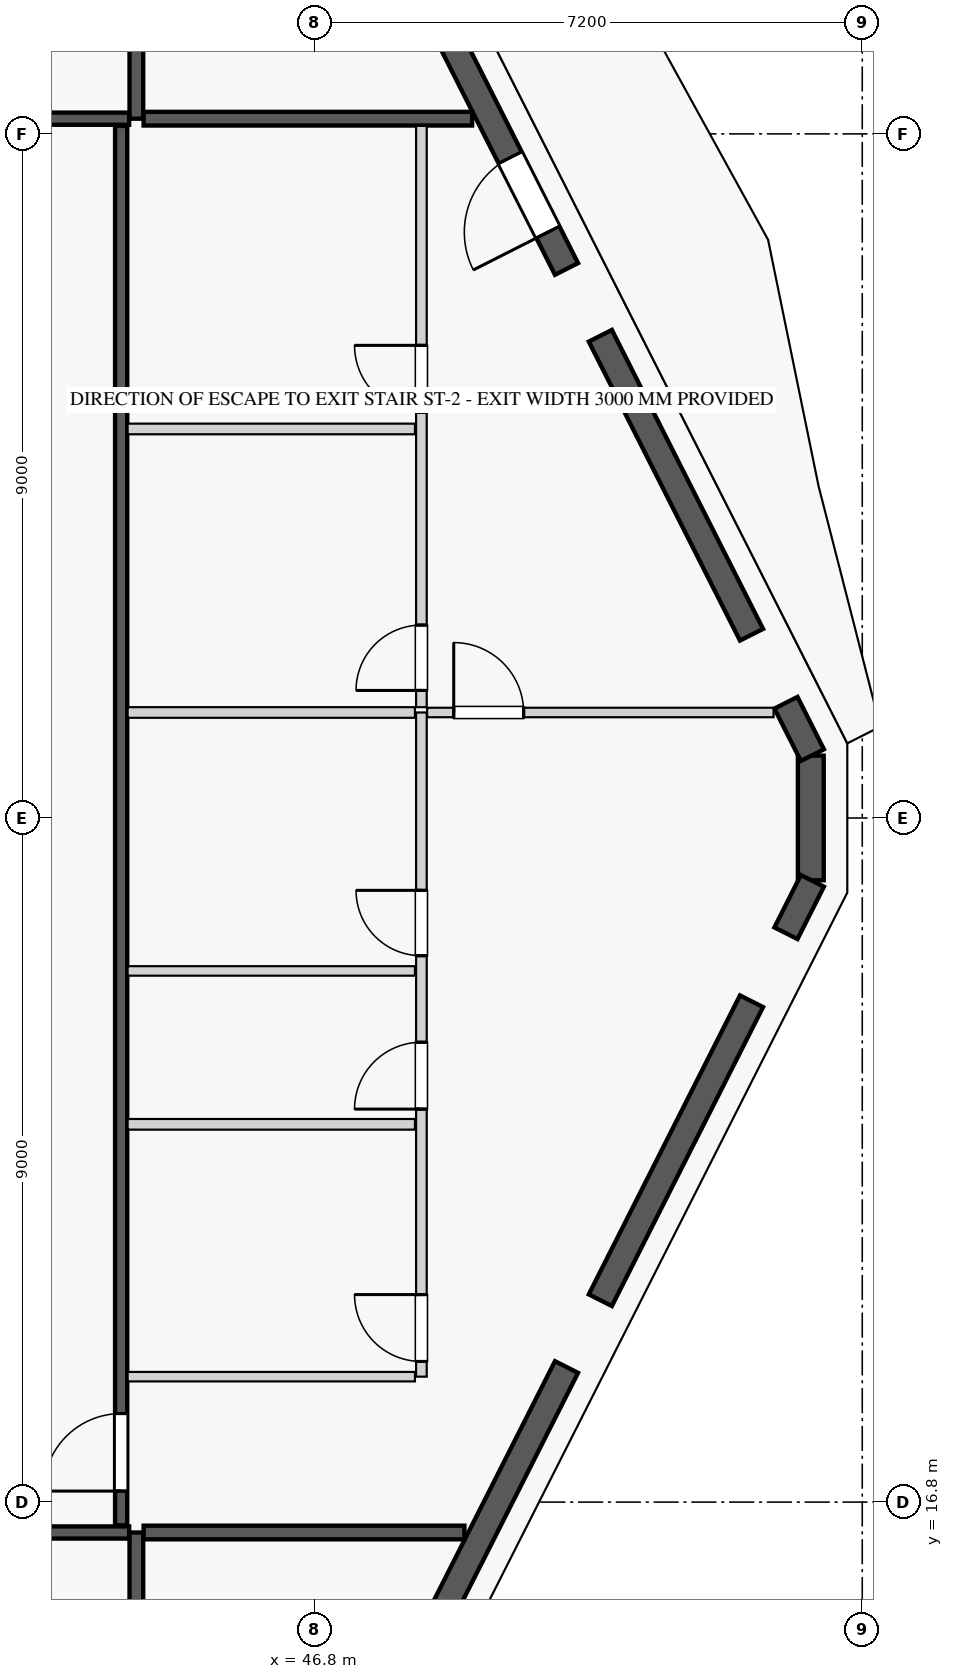
"""IFC4 building model, lengths in metres.
Left out: names, types, materials, properties, quantities, classifications, styles, units other than length and angle.
Written with IfcOpenShell. Run it as: python <this file> out.ifc"""

import sys

from ifc_helpers import new_model, si_unit, direction, frame, frame_2d, origin, origin_2d, place, context, subcontext, project, spatial, rectangle, extrude, element, fill, save


model = new_model("IFC4")
c1 = context("Model", 3, precision=1e-05, world=origin(), true_north=direction((0.0, 1.0)))
c2 = subcontext(c1, "Body", "Model", "MODEL_VIEW")
j1 = project(units=[si_unit("LENGTHUNIT", "METRE"), si_unit("PLANEANGLEUNIT", "RADIAN")], contexts=[c1])
p1 = place(None, origin())
s1 = spatial("IfcSite", under=j1, at=p1, CompositionType="ELEMENT")
p2 = place(p1, origin())
s2 = spatial("IfcBuilding", under=s1, at=p2, CompositionType="ELEMENT")
p3 = place(p2, frame((0.0, 0.0, 241.6)))
s3 = spatial("IfcBuildingStorey", under=s2, at=p3, CompositionType="ELEMENT", Elevation=241.6)
for number, where, z_axis, x_axis in (
    (1, (50.264, 19.033, 0.0), (0.0, 0.0, 1.0), (1.0, 0.0, 0.0)),
    (2, (52.737, 23.845, 0.0), (0.0, 0.0, 1.0), (1.0, 0.0, 0.0)),
    (3, (52.737, 27.755, 0.0), (0.0, 0.0, 1.0), (1.0, 0.0, 0.0)),
    (4, (50.264, 32.567, 0.0), (0.0, 0.0, 1.0), (1.0, 0.0, 0.0)),
):
    element("IfcColumn", number, at=place(p3, frame(where, z_axis=z_axis, x_axis=x_axis)), inside=s3, PredefinedType="COLUMN", context=c2, shape_type="SweptSolid", body=[
        extrude(rectangle(XDim=0.75, YDim=0.75, at=origin_2d()), origin(), (0.0, 0.0, 1.0), 3.65),
    ])
p4 = place(p3, frame((52.737, 25.8, 0.0), z_axis=(0.0, 0.0, 1.0), x_axis=(0.0, 1.0, 0.0)))
e5 = element("IfcColumn", 5, at=p4, inside=s3, PredefinedType="PILASTER", context=c2, shape_type="SweptSolid", body=[
    extrude(rectangle(XDim=0.5, YDim=0.35, at=origin_2d()), origin(), (0.0, 0.0, 1.0), 3.65),
])
p5 = place(p3, frame((53.323, 24.98, 0.0), z_axis=(0.0, 0.0, 1.0), x_axis=(0.0, 1.0, 0.0)))
e6 = element("IfcWall", 6, at=p5, inside=s3, PredefinedType="STANDARD", context=c2, shape_type="SweptSolid", body=[
    extrude(rectangle(XDim=1.64, YDim=0.34, at=frame_2d((0.82, 0.0))), origin(), (0.0, 0.0, 1.0), 3.45),
])
p6 = place(p3, frame((48.032, 14.473, 0.0), z_axis=(0.0, 0.0, 1.0), x_axis=(0.451539564999, 0.892251097641, 0.0)))
e7 = element("IfcWall", 7, at=p6, inside=s3, PredefinedType="STANDARD", context=c2, shape_type="SweptSolid", body=[
    extrude(rectangle(XDim=4.6, YDim=0.34, at=frame_2d((2.3, 0.0))), origin(), (0.0, 0.0, 1.0), 2.983),
])
p7 = place(p6, frame((0.4, 0.0, 0.75)))
e8 = element("IfcOpeningElement", 8, at=p7, cuts=e7, PredefinedType="OPENING", context=c2, shape_type="SweptSolid", body=[
    extrude(rectangle(XDim=1.1, YDim=2.0, at=frame_2d((0.55, 1.0))), frame((0.0, 0.18, 0.0), z_axis=(0.0, -1.0, 0.0), x_axis=(1.0, 0.0, 0.0)), (0.0, 0.0, 1.0), 0.36),
])
p8 = place(p6, frame((2.851, 0.0, 0.75)))
e9 = element("IfcOpeningElement", 9, at=p8, cuts=e7, PredefinedType="OPENING", context=c2, shape_type="SweptSolid", body=[
    extrude(rectangle(XDim=1.1, YDim=2.0, at=frame_2d((0.55, 1.0))), frame((0.0, 0.18, 0.0), z_axis=(0.0, -1.0, 0.0), x_axis=(1.0, 0.0, 0.0)), (0.0, 0.0, 1.0), 0.36),
])
p9 = place(p3, frame((50.554, 19.456, 0.0), z_axis=(0.0, 0.0, 1.0), x_axis=(0.45130817501, 0.892368158984, 0.0)))
e10 = element("IfcWall", 10, at=p9, inside=s3, PredefinedType="STANDARD", context=c2, shape_type="SweptSolid", body=[
    extrude(rectangle(XDim=4.407, YDim=0.34, at=frame_2d((2.204, 0.0))), origin(), (0.0, 0.0, 1.0), 2.983),
])
p10 = place(p9, frame((1.429, 0.0, 0.75)))
e11 = element("IfcOpeningElement", 11, at=p10, cuts=e10, PredefinedType="OPENING", context=c2, shape_type="SweptSolid", body=[
    extrude(rectangle(XDim=1.55, YDim=2.05, at=frame_2d((0.775, 1.025))), frame((0.0, 0.18, 0.0), z_axis=(0.0, -1.0, 0.0), x_axis=(1.0, 0.0, 0.0)), (0.0, 0.0, 1.0), 0.36),
])
for number, where, z_axis, x_axis in (
    (12, (52.996, 24.284, 0.0), (0.0, 0.0, 1.0), (0.451, 0.893, 0.0)),
    (13, (53.344, 26.627, 0.0), (0.0, 0.0, 1.0), (-0.451, 0.893, 0.0)),
):
    element("IfcWall", number, at=place(p3, frame(where, z_axis=z_axis, x_axis=x_axis)), inside=s3, PredefinedType="STANDARD", context=c2, shape_type="SweptSolid", body=[
        extrude(rectangle(XDim=0.772, YDim=0.34, at=frame_2d((0.386, 0.0))), origin(), (0.0, 0.0, 1.0), 3.45),
    ])
p11 = place(p3, frame((52.543, 28.211, 0.0), z_axis=(0.0, 0.0, 1.0), x_axis=(-0.451285866323, 0.892379441077, 0.0)))
e14 = element("IfcWall", 14, at=p11, inside=s3, PredefinedType="STANDARD", context=c2, shape_type="SweptSolid", body=[
    extrude(rectangle(XDim=4.407, YDim=0.34, at=frame_2d((2.204, 0.0))), origin(), (0.0, 0.0, 1.0), 2.983),
])
p12 = place(p11, frame((1.654, 0.0, 0.75)))
e15 = element("IfcOpeningElement", 15, at=p12, cuts=e14, PredefinedType="OPENING", context=c2, shape_type="SweptSolid", body=[
    extrude(rectangle(XDim=1.1, YDim=2.0, at=frame_2d((0.55, 1.0))), frame((0.0, 0.18, 0.0), z_axis=(0.0, -1.0, 0.0), x_axis=(1.0, 0.0, 0.0)), (0.0, 0.0, 1.0), 0.36),
])
p13 = place(p3, frame((50.109, 33.023, 0.0), z_axis=(0.0, 0.0, 1.0), x_axis=(-0.451539564999, 0.892251097641, 0.0)))
e16 = element("IfcWall", 16, at=p13, inside=s3, PredefinedType="STANDARD", context=c2, shape_type="SweptSolid", body=[
    extrude(rectangle(XDim=4.6, YDim=0.34, at=frame_2d((2.3, 0.0))), origin(), (0.0, 0.0, 1.0), 2.983),
])
p14 = place(p13, frame((0.542, 0.0, 0.0)))
e17 = element("IfcOpeningElement", 17, at=p14, cuts=e16, PredefinedType="OPENING", context=c2, shape_type="SweptSolid", body=[
    extrude(rectangle(XDim=1.1, YDim=2.25, at=frame_2d((0.55, 1.125))), frame((0.0, 0.18, 0.0), z_axis=(0.0, -1.0, 0.0), x_axis=(1.0, 0.0, 0.0)), (0.0, 0.0, 1.0), 0.36),
])
p15 = place(p13, frame((2.988, 0.0, 0.75)))
e18 = element("IfcOpeningElement", 18, at=p15, cuts=e16, PredefinedType="OPENING", context=c2, shape_type="SweptSolid", body=[
    extrude(rectangle(XDim=1.1, YDim=2.0, at=frame_2d((0.55, 1.0))), frame((0.0, 0.18, 0.0), z_axis=(0.0, -1.0, 0.0), x_axis=(1.0, 0.0, 0.0)), (0.0, 0.0, 1.0), 0.36),
])
p16 = place(p3, frame((44.45, 8.119, 0.0), z_axis=(0.0, 0.0, 1.0), x_axis=(0.0, 1.0, 0.0)))
e19 = element("IfcWall", 19, at=p16, inside=s3, PredefinedType="PARTITIONING", context=c2, shape_type="SweptSolid", body=[
    extrude(rectangle(XDim=8.281, YDim=0.18, at=frame_2d((4.141, 0.0))), origin(), (0.0, 0.0, 1.0), 3.45),
])
p17 = place(p3, frame((35.749, 16.4, 0.0), z_axis=(0.0, 0.0, 1.0), x_axis=(1.0, 0.0, 0.0)))
e20 = element("IfcWall", 20, at=p17, inside=s3, PredefinedType="PARTITIONING", context=c2, shape_type="SweptSolid", body=[
    extrude(rectangle(XDim=8.606, YDim=0.16, at=frame_2d((4.303, 0.0))), origin(), (0.0, 0.0, 1.0), 3.45),
])
p18 = place(p17, frame((0.355, 0.0, 0.0)))
e21 = element("IfcOpeningElement", 21, at=p18, cuts=e20, PredefinedType="OPENING", context=c2, shape_type="SweptSolid", body=[
    extrude(rectangle(XDim=1.02, YDim=2.25, at=frame_2d((0.51, 1.125))), frame((0.0, 0.09, 0.0), z_axis=(0.0, -1.0, 0.0), x_axis=(1.0, 0.0, 0.0)), (0.0, 0.0, 1.0), 0.18),
])
p19 = place(p3, frame((44.45, 35.0, 0.0), z_axis=(0.0, 0.0, 1.0), x_axis=(0.0, 1.0, 0.0)))
e22 = element("IfcWall", 22, at=p19, inside=s3, PredefinedType="PARTITIONING", context=c2, shape_type="SweptSolid", body=[
    extrude(rectangle(XDim=8.481, YDim=0.18, at=frame_2d((4.24, 0.0))), origin(), (0.0, 0.0, 1.0), 3.45),
])
p20 = place(p3, frame((20.445, 35.0, 0.0), z_axis=(0.0, 0.0, 1.0), x_axis=(1.0, 0.0, 0.0)))
e23 = element("IfcWall", 23, at=p20, inside=s3, PredefinedType="PARTITIONING", context=c2, shape_type="SweptSolid", body=[
    extrude(rectangle(XDim=23.91, YDim=0.16, at=frame_2d((11.955, 0.0))), origin(), (0.0, 0.0, 1.0), 3.45),
])
p21 = place(p20, frame((0.405, 0.0, 0.0)))
e24 = element("IfcOpeningElement", 24, at=p21, cuts=e23, PredefinedType="OPENING", context=c2, shape_type="SweptSolid", body=[
    extrude(rectangle(XDim=1.35, YDim=2.35, at=frame_2d((0.675, 1.175))), frame((0.0, 0.09, 0.0), z_axis=(0.0, -1.0, 0.0), x_axis=(1.0, 0.0, 0.0)), (0.0, 0.0, 1.0), 0.18),
])
p22 = place(p3, frame((44.545, 16.4, 0.0), z_axis=(0.0, 0.0, 1.0), x_axis=(1.0, 0.0, 0.0)))
e25 = element("IfcWall", 25, at=p22, inside=s3, PredefinedType="PARTITIONING", context=c2, shape_type="SweptSolid", body=[
    extrude(rectangle(XDim=4.221, YDim=0.18, at=frame_2d((2.111, 0.0))), origin(), (0.0, 0.0, 1.0), 3.45),
])
p23 = place(p3, frame((44.545, 35.0, 0.0), z_axis=(0.0, 0.0, 1.0), x_axis=(1.0, 0.0, 0.0)))
e26 = element("IfcWall", 26, at=p23, inside=s3, PredefinedType="PARTITIONING", context=c2, shape_type="SweptSolid", body=[
    extrude(rectangle(XDim=4.322, YDim=0.18, at=frame_2d((2.161, 0.0))), origin(), (0.0, 0.0, 1.0), 3.45),
])
p24 = place(p3, frame((44.25, 16.495, 0.0), z_axis=(0.0, 0.0, 1.0), x_axis=(0.0, 1.0, 0.0)))
e27 = element("IfcWall", 27, at=p24, inside=s3, PredefinedType="PARTITIONING", context=c2, shape_type="SweptSolid", body=[
    extrude(rectangle(XDim=18.41, YDim=0.16, at=frame_2d((9.205, 0.0))), origin(), (0.0, 0.0, 1.0), 3.137),
])
p25 = place(p24, frame((0.45, 0.0, 0.0)))
e28 = element("IfcOpeningElement", 28, at=p25, cuts=e27, PredefinedType="OPENING", context=c2, shape_type="SweptSolid", body=[
    extrude(rectangle(XDim=1.02, YDim=2.25, at=frame_2d((0.51, 1.125))), frame((0.0, 0.09, 0.0), z_axis=(0.0, -1.0, 0.0), x_axis=(1.0, 0.0, 0.0)), (0.0, 0.0, 1.0), 0.18),
])
p26 = place(p3, frame((44.335, 18.45, 0.0), z_axis=(0.0, 0.0, 1.0), x_axis=(1.0, 0.0, 0.0)))
e29 = element("IfcWall", 29, at=p26, inside=s3, PredefinedType="PARTITIONING", context=c2, shape_type="SweptSolid", body=[
    extrude(rectangle(XDim=3.78, YDim=0.125, at=frame_2d((1.89, 0.0))), origin(), (0.0, 0.0, 1.0), 3.45),
])
p27 = place(p3, frame((48.2, 18.45, 0.0), z_axis=(0.0, 0.0, 1.0), x_axis=(0.0, 1.0, 0.0)))
e30 = element("IfcWall", 30, at=p27, inside=s3, PredefinedType="PLUMBINGWALL", context=c2, shape_type="SweptSolid", body=[
    extrude(rectangle(XDim=8.738, YDim=0.14, at=frame_2d((4.369, 0.0))), origin(), (0.0, 0.0, 1.0), 3.45),
])
p28 = place(p27, frame((0.2, 0.0, 0.0)))
e31 = element("IfcOpeningElement", 31, at=p28, cuts=e30, PredefinedType="OPENING", context=c2, shape_type="SweptSolid", body=[
    extrude(rectangle(XDim=0.88, YDim=2.15, at=frame_2d((0.44, 1.075))), frame((0.0, 0.08, 0.0), z_axis=(0.0, -1.0, 0.0), x_axis=(1.0, 0.0, 0.0)), (0.0, 0.0, 1.0), 0.16),
])
p29 = place(p27, frame((3.52, 0.0, 0.0)))
e32 = element("IfcOpeningElement", 32, at=p29, cuts=e30, PredefinedType="OPENING", context=c2, shape_type="SweptSolid", body=[
    extrude(rectangle(XDim=0.88, YDim=2.15, at=frame_2d((0.44, 1.075))), frame((0.0, 0.08, 0.0), z_axis=(0.0, -1.0, 0.0), x_axis=(1.0, 0.0, 0.0)), (0.0, 0.0, 1.0), 0.16),
])
p30 = place(p27, frame((5.538, 0.0, 0.0)))
e33 = element("IfcOpeningElement", 33, at=p30, cuts=e30, PredefinedType="OPENING", context=c2, shape_type="SweptSolid", body=[
    extrude(rectangle(XDim=0.86, YDim=2.1, at=frame_2d((0.43, 1.05))), frame((0.0, 0.08, 0.0), z_axis=(0.0, -1.0, 0.0), x_axis=(1.0, 0.0, 0.0)), (0.0, 0.0, 1.0), 0.16),
])
p31 = place(p3, frame((48.2, 27.258, 0.0), z_axis=(0.0, 0.0, 1.0), x_axis=(0.0, 1.0, 0.0)))
e34 = element("IfcWall", 34, at=p31, inside=s3, PredefinedType="PLUMBINGWALL", context=c2, shape_type="SweptSolid", body=[
    extrude(rectangle(XDim=7.647, YDim=0.14, at=frame_2d((3.823, 0.0))), origin(), (0.0, 0.0, 1.0), 3.45),
])
p32 = place(p31, frame((0.22, 0.0, 0.0)))
e35 = element("IfcOpeningElement", 35, at=p32, cuts=e34, PredefinedType="OPENING", context=c2, shape_type="SweptSolid", body=[
    extrude(rectangle(XDim=0.86, YDim=2.1, at=frame_2d((0.43, 1.05))), frame((0.0, 0.08, 0.0), z_axis=(0.0, -1.0, 0.0), x_axis=(1.0, 0.0, 0.0)), (0.0, 0.0, 1.0), 0.16),
])
p33 = place(p31, frame((3.88, 0.0, 0.0)))
e36 = element("IfcOpeningElement", 36, at=p33, cuts=e34, PredefinedType="OPENING", context=c2, shape_type="SweptSolid", body=[
    extrude(rectangle(XDim=0.88, YDim=2.15, at=frame_2d((0.44, 1.075))), frame((0.0, 0.08, 0.0), z_axis=(0.0, -1.0, 0.0), x_axis=(1.0, 0.0, 0.0)), (0.0, 0.0, 1.0), 0.16),
])
p34 = place(p3, frame((44.335, 27.188, 0.0), z_axis=(0.0, 0.0, 1.0), x_axis=(1.0, 0.0, 0.0)))
e37 = element("IfcWall", 37, at=p34, inside=s3, PredefinedType="PLUMBINGWALL", context=c2, shape_type="SweptSolid", body=[
    extrude(rectangle(XDim=3.78, YDim=0.14, at=frame_2d((1.89, 0.0))), origin(), (0.0, 0.0, 1.0), 3.45),
])
p35 = place(p3, frame((48.275, 27.188, 0.0), z_axis=(0.0, 0.0, 1.0), x_axis=(1.0, 0.0, 0.0)))
e38 = element("IfcWall", 38, at=p35, inside=s3, PredefinedType="PARTITIONING", context=c2, shape_type="SweptSolid", body=[
    extrude(rectangle(XDim=4.558, YDim=0.125, at=frame_2d((2.279, 0.0))), origin(), (0.0, 0.0, 1.0), 3.45),
])
p36 = place(p35, frame((0.35, 0.0, 0.0)))
e39 = element("IfcOpeningElement", 39, at=p36, cuts=e38, PredefinedType="OPENING", context=c2, shape_type="SweptSolid", body=[
    extrude(rectangle(XDim=0.92, YDim=2.15, at=frame_2d((0.46, 1.075))), frame((0.0, 0.073, 0.0), z_axis=(0.0, -1.0, 0.0), x_axis=(1.0, 0.0, 0.0)), (0.0, 0.0, 1.0), 0.145),
])
p37 = place(p3, frame((44.335, 21.77, 0.0), z_axis=(0.0, 0.0, 1.0), x_axis=(1.0, 0.0, 0.0)))
e40 = element("IfcWall", 40, at=p37, inside=s3, PredefinedType="PLUMBINGWALL", context=c2, shape_type="SweptSolid", body=[
    extrude(rectangle(XDim=3.78, YDim=0.14, at=frame_2d((1.89, 0.0))), origin(), (0.0, 0.0, 1.0), 3.45),
])
p38 = place(p3, frame((44.335, 23.788, 0.0), z_axis=(0.0, 0.0, 1.0), x_axis=(1.0, 0.0, 0.0)))
e41 = element("IfcWall", 41, at=p38, inside=s3, PredefinedType="PARTITIONING", context=c2, shape_type="SweptSolid", body=[
    extrude(rectangle(XDim=3.78, YDim=0.125, at=frame_2d((1.89, 0.0))), origin(), (0.0, 0.0, 1.0), 2.907),
])
p39 = place(p3, frame((44.335, 30.918, 0.0), z_axis=(0.0, 0.0, 1.0), x_axis=(1.0, 0.0, 0.0)))
e42 = element("IfcWall", 42, at=p39, inside=s3, PredefinedType="PLUMBINGWALL", context=c2, shape_type="SweptSolid", body=[
    extrude(rectangle(XDim=3.78, YDim=0.14, at=frame_2d((1.89, 0.0))), origin(), (0.0, 0.0, 1.0), 3.45),
])
p40 = place(p7, origin())
e43 = element("IfcWindow", 43, at=p40, inside=s3, PartitioningType="SINGLE_PANEL", PredefinedType="WINDOW", context=c2, shape_type="SweptSolid", body=[
    extrude(rectangle(XDim=1.1, YDim=2.0, at=frame_2d((0.55, 1.0))), frame((0.0, 0.03, 0.0), z_axis=(0.0, -1.0, 0.0), x_axis=(1.0, 0.0, 0.0)), (0.0, 0.0, 1.0), 0.06),
])
fill(e8, e43)
p41 = place(p10, origin())
e44 = element("IfcWindow", 44, at=p41, inside=s3, PartitioningType="SINGLE_PANEL", PredefinedType="WINDOW", context=c2, shape_type="SweptSolid", body=[
    extrude(rectangle(XDim=1.55, YDim=2.05, at=frame_2d((0.775, 1.025))), frame((0.0, 0.03, 0.0), z_axis=(0.0, -1.0, 0.0), x_axis=(1.0, 0.0, 0.0)), (0.0, 0.0, 1.0), 0.06),
])
fill(e11, e44)
p42 = place(p12, origin())
e45 = element("IfcWindow", 45, at=p42, inside=s3, PartitioningType="SINGLE_PANEL", PredefinedType="WINDOW", context=c2, shape_type="SweptSolid", body=[
    extrude(rectangle(XDim=1.1, YDim=2.0, at=frame_2d((0.55, 1.0))), frame((0.0, 0.03, 0.0), z_axis=(0.0, -1.0, 0.0), x_axis=(1.0, 0.0, 0.0)), (0.0, 0.0, 1.0), 0.06),
])
fill(e15, e45)
p43 = place(p14, origin())
e46 = element("IfcDoor", 46, at=p43, inside=s3, OperationType="SINGLE_SWING_LEFT", PredefinedType="DOOR", context=c2, shape_type="SweptSolid", body=[
    extrude(rectangle(XDim=1.1, YDim=2.25, at=frame_2d((0.55, 1.125))), frame((0.0, 0.025, 0.0), z_axis=(0.0, -1.0, 0.0), x_axis=(1.0, 0.0, 0.0)), (0.0, 0.0, 1.0), 0.05),
])
fill(e17, e46)
p44 = place(p28, origin())
e47 = element("IfcDoor", 47, at=p44, inside=s3, OperationType="SINGLE_SWING_RIGHT", PredefinedType="DOOR", context=c2, shape_type="SweptSolid", body=[
    extrude(rectangle(XDim=0.88, YDim=2.15, at=frame_2d((0.44, 1.075))), frame((0.0, 0.025, 0.0), z_axis=(0.0, -1.0, 0.0), x_axis=(1.0, 0.0, 0.0)), (0.0, 0.0, 1.0), 0.05),
])
fill(e31, e47)
p45 = place(p29, origin())
e48 = element("IfcDoor", 48, at=p45, inside=s3, OperationType="SINGLE_SWING_LEFT", PredefinedType="DOOR", context=c2, shape_type="SweptSolid", body=[
    extrude(rectangle(XDim=0.88, YDim=2.15, at=frame_2d((0.44, 1.075))), frame((0.0, 0.025, 0.0), z_axis=(0.0, -1.0, 0.0), x_axis=(1.0, 0.0, 0.0)), (0.0, 0.0, 1.0), 0.05),
])
fill(e32, e48)
p46 = place(p30, origin())
e49 = element("IfcDoor", 49, at=p46, inside=s3, OperationType="SINGLE_SWING_RIGHT", PredefinedType="DOOR", context=c2, shape_type="SweptSolid", body=[
    extrude(rectangle(XDim=0.86, YDim=2.1, at=frame_2d((0.43, 1.05))), frame((0.0, 0.025, 0.0), z_axis=(0.0, -1.0, 0.0), x_axis=(1.0, 0.0, 0.0)), (0.0, 0.0, 1.0), 0.05),
])
fill(e33, e49)
p47 = place(p32, origin())
e50 = element("IfcDoor", 50, at=p47, inside=s3, OperationType="SINGLE_SWING_LEFT", PredefinedType="DOOR", context=c2, shape_type="SweptSolid", body=[
    extrude(rectangle(XDim=0.86, YDim=2.1, at=frame_2d((0.43, 1.05))), frame((0.0, 0.025, 0.0), z_axis=(0.0, -1.0, 0.0), x_axis=(1.0, 0.0, 0.0)), (0.0, 0.0, 1.0), 0.05),
])
fill(e35, e50)
p48 = place(p33, origin())
e51 = element("IfcDoor", 51, at=p48, inside=s3, OperationType="SINGLE_SWING_RIGHT", PredefinedType="DOOR", context=c2, shape_type="SweptSolid", body=[
    extrude(rectangle(XDim=0.88, YDim=2.15, at=frame_2d((0.44, 1.075))), frame((0.0, 0.025, 0.0), z_axis=(0.0, -1.0, 0.0), x_axis=(1.0, 0.0, 0.0)), (0.0, 0.0, 1.0), 0.05),
])
fill(e36, e51)
p49 = place(p25, origin())
e52 = element("IfcDoor", 52, at=p49, inside=s3, OperationType="SINGLE_SWING_LEFT", PredefinedType="DOOR", context=c2, shape_type="SweptSolid", body=[
    extrude(rectangle(XDim=1.02, YDim=2.25, at=frame_2d((0.51, 1.125))), frame((0.0, 0.025, 0.0), z_axis=(0.0, -1.0, 0.0), x_axis=(1.0, 0.0, 0.0)), (0.0, 0.0, 1.0), 0.05),
])
fill(e28, e52)
p50 = place(p36, origin())
e53 = element("IfcDoor", 53, at=p50, inside=s3, OperationType="SINGLE_SWING_LEFT", PredefinedType="DOOR", context=c2, shape_type="SweptSolid", body=[
    extrude(rectangle(XDim=0.92, YDim=2.15, at=frame_2d((0.46, 1.075))), frame((0.0, 0.025, 0.0), z_axis=(0.0, -1.0, 0.0), x_axis=(1.0, 0.0, 0.0)), (0.0, 0.0, 1.0), 0.05),
])
fill(e39, e53)
p51 = place(p8, origin())
e54 = element("IfcWindow", 54, at=p51, inside=s3, PartitioningType="SINGLE_PANEL", PredefinedType="WINDOW", context=c2, shape_type="SweptSolid", body=[
    extrude(rectangle(XDim=1.1, YDim=2.0, at=frame_2d((0.55, 1.0))), frame((0.0, 0.03, 0.0), z_axis=(0.0, -1.0, 0.0), x_axis=(1.0, 0.0, 0.0)), (0.0, 0.0, 1.0), 0.06),
])
fill(e9, e54)
p52 = place(p15, origin())
e55 = element("IfcWindow", 55, at=p52, inside=s3, PartitioningType="SINGLE_PANEL", PredefinedType="WINDOW", context=c2, shape_type="SweptSolid", body=[
    extrude(rectangle(XDim=1.1, YDim=2.0, at=frame_2d((0.55, 1.0))), frame((0.0, 0.03, 0.0), z_axis=(0.0, -1.0, 0.0), x_axis=(1.0, 0.0, 0.0)), (0.0, 0.0, 1.0), 0.06),
])
fill(e18, e55)
save(model, sys.argv[1])
